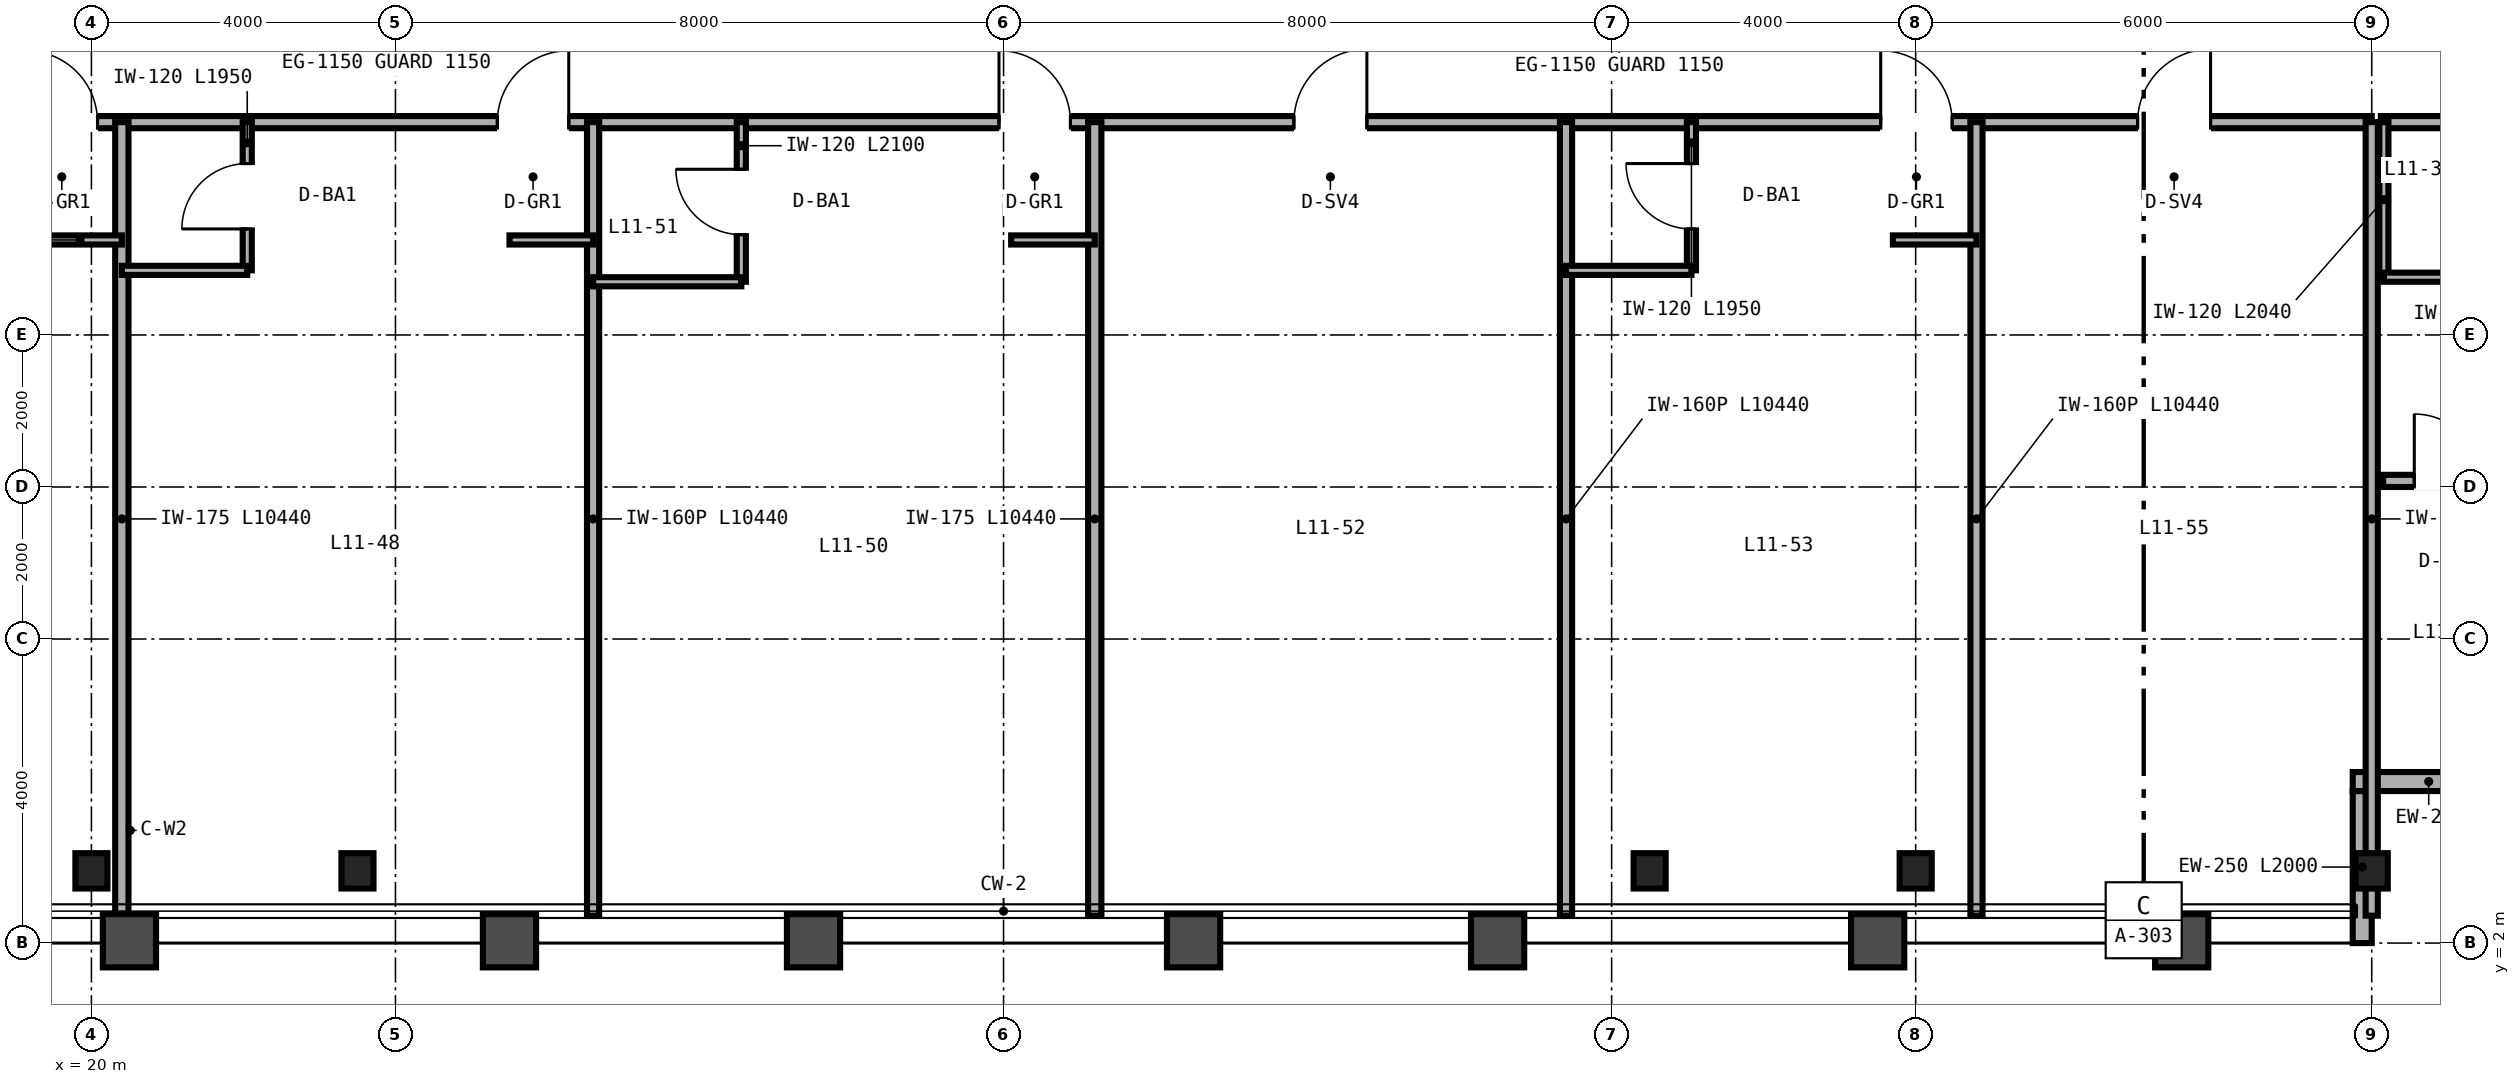
"""IFC4 building model, lengths in metres.
Left out: names, types, materials, properties, quantities, classifications, styles, units other than length and angle.
Written with IfcOpenShell. Run it as: python <this file> out.ifc"""

import sys

from ifc_helpers import new_model, si_unit, direction, frame, frame_2d, origin, origin_2d, place, context, subcontext, project, spatial, rectangle, i_section, extrude, source, transform, mapped, element, fill, save


model = new_model("IFC4")
c1 = context("Model", 3, precision=1e-05, world=origin(), true_north=direction((0.0, 1.0)))
c2 = subcontext(c1, "Body", "Model", "MODEL_VIEW")
j1 = project(units=[si_unit("LENGTHUNIT", "METRE"), si_unit("PLANEANGLEUNIT", "RADIAN")], contexts=[c1])
p1 = place(None, origin())
s1 = spatial("IfcSite", under=j1, at=p1, CompositionType="ELEMENT")
p2 = place(p1, origin())
s2 = spatial("IfcBuilding", under=s1, at=p2, CompositionType="ELEMENT")
p3 = place(p2, frame((0.0, 0.0, 49.2)))
s3 = spatial("IfcBuildingStorey", under=s2, at=p3, CompositionType="ELEMENT", Elevation=49.2)
m1 = source(origin(), c2, "Body", "SweptSolid", [
    extrude(i_section(OverallWidth=0.422, OverallDepth=0.465, WebThickness=0.045, FlangeThickness=0.073, FilletRadius=0.025, at=origin_2d()), origin(), (0.0, 0.0, 1.0), 3.35),
])
for number, where, z_axis, x_axis in (
    (1, (20.0, 2.95, 0.0), (0.0, 0.0, 1.0), (1.0, 0.0, 0.0)),
    (2, (23.5, 2.95, 0.0), (0.0, 0.0, 1.0), (1.0, 0.0, 0.0)),
    (3, (40.5, 2.95, 0.0), (0.0, 0.0, 1.0), (1.0, 0.0, 0.0)),
    (4, (44.0, 2.95, 0.0), (0.0, 0.0, 1.0), (1.0, 0.0, 0.0)),
    (5, (50.0, 2.95, 0.0), (0.0, 0.0, 1.0), (1.0, 0.0, 0.0)),
):
    element("IfcColumn", number, at=place(p3, frame(where, z_axis=z_axis, x_axis=x_axis)), inside=s3, PredefinedType="COLUMN", context=c2, shape_type="MappedRepresentation", body=[
        mapped(m1, transform((0.0, 0.0, 0.0), scale=1.0)),
    ])
p4 = place(p3, frame((49.875, 2.0, 0.0), z_axis=(0.0, 0.0, 1.0), x_axis=(0.0, 1.0, 0.0)))
e6 = element("IfcWall", 6, at=p4, inside=s3, PredefinedType="SOLIDWALL", context=c2, shape_type="SweptSolid", body=[
    extrude(rectangle(XDim=2.0, YDim=0.25, at=frame_2d((1.0, 0.0))), origin(), (0.0, 0.0, 1.0), 2.657),
])
p5 = place(p3, frame((49.75, 4.125, 0.0), z_axis=(0.0, 0.0, 1.0), x_axis=(1.0, 0.0, 0.0)))
e7 = element("IfcWall", 7, at=p5, inside=s3, PredefinedType="SOLIDWALL", context=c2, shape_type="SweptSolid", body=[
    extrude(rectangle(XDim=2.0, YDim=0.25, at=frame_2d((1.0, 0.0))), origin(), (0.0, 0.0, 1.0), 3.35),
])
p6 = place(p3, frame((50.12, 12.8, 0.0), z_axis=(0.0, 0.0, 1.0), x_axis=(1.0, 0.0, 0.0)))
e8 = element("IfcWall", 8, at=p6, inside=s3, PredefinedType="PARTITIONING", context=c2, shape_type="SweptSolid", body=[
    extrude(rectangle(XDim=5.68, YDim=0.16, at=frame_2d((2.84, 0.0))), origin(), (0.0, 0.0, 1.0), 3.35),
])
p7 = place(p6, frame((3.15, 0.0, 0.0)))
e9 = element("IfcOpeningElement", 9, at=p7, cuts=e8, PredefinedType="OPENING", context=c2, shape_type="SweptSolid", body=[
    extrude(rectangle(XDim=0.94, YDim=2.15, at=frame_2d((0.47, 1.075))), frame((0.0, 0.09, 0.0), z_axis=(0.0, -1.0, 0.0), x_axis=(1.0, 0.0, 0.0)), (0.0, 0.0, 1.0), 0.18),
])
p8 = place(p3, frame((50.16, 10.76, 0.0), z_axis=(0.0, 0.0, 1.0), x_axis=(0.0, 1.0, 0.0)))
e10 = element("IfcWall", 10, at=p8, inside=s3, PredefinedType="PARTITIONING", context=c2, shape_type="SweptSolid", body=[
    extrude(rectangle(XDim=2.04, YDim=0.12, at=frame_2d((1.02, 0.0))), origin(), (0.0, 0.0, 1.0), 3.35),
])
p9 = place(p3, frame((50.16, 10.76, 0.0), z_axis=(0.0, 0.0, 1.0), x_axis=(1.0, 0.0, 0.0)))
e11 = element("IfcWall", 11, at=p9, inside=s3, PredefinedType="PARTITIONING", context=c2, shape_type="SweptSolid", body=[
    extrude(rectangle(XDim=1.65, YDim=0.12, at=frame_2d((0.825, 0.0))), origin(), (0.0, 0.0, 1.0), 3.35),
])
p10 = place(p3, frame((50.15, 8.08, 0.0), z_axis=(0.0, 0.0, 1.0), x_axis=(1.0, 0.0, 0.0)))
e12 = element("IfcWall", 12, at=p10, inside=s3, PredefinedType="PARTITIONING", context=c2, shape_type="SweptSolid", body=[
    extrude(rectangle(XDim=1.7, YDim=0.16, at=frame_2d((0.85, 0.0))), origin(), (0.0, 0.0, 1.0), 3.35),
])
p11 = place(p10, frame((0.41, 0.0, 0.0)))
e13 = element("IfcOpeningElement", 13, at=p11, cuts=e12, PredefinedType="OPENING", context=c2, shape_type="SweptSolid", body=[
    extrude(rectangle(XDim=0.88, YDim=2.15, at=frame_2d((0.44, 1.075))), frame((0.0, 0.09, 0.0), z_axis=(0.0, -1.0, 0.0), x_axis=(1.0, 0.0, 0.0)), (0.0, 0.0, 1.0), 0.18),
])
p12 = place(p3, frame((14.0, 12.8, 0.0), z_axis=(0.0, 0.0, 1.0), x_axis=(1.0, 0.0, 0.0)))
e14 = element("IfcWall", 14, at=p12, inside=s3, PredefinedType="PARTITIONING", context=c2, shape_type="SweptSolid", body=[
    extrude(rectangle(XDim=36.0, YDim=0.16, at=frame_2d((18.0, 0.0))), origin(), (0.0, 0.0, 1.0), 2.571),
])
p13 = place(p12, frame((5.14, 0.0, 0.0)))
e15 = element("IfcOpeningElement", 15, at=p13, cuts=e14, PredefinedType="OPENING", context=c2, shape_type="SweptSolid", body=[
    extrude(rectangle(XDim=0.94, YDim=2.15, at=frame_2d((0.47, 1.075))), frame((0.0, 0.09, 0.0), z_axis=(0.0, -1.0, 0.0), x_axis=(1.0, 0.0, 0.0)), (0.0, 0.0, 1.0), 0.18),
])
p14 = place(p12, frame((11.34, 0.0, 0.0)))
e16 = element("IfcOpeningElement", 16, at=p14, cuts=e14, PredefinedType="OPENING", context=c2, shape_type="SweptSolid", body=[
    extrude(rectangle(XDim=0.94, YDim=2.15, at=frame_2d((0.47, 1.075))), frame((0.0, 0.09, 0.0), z_axis=(0.0, -1.0, 0.0), x_axis=(1.0, 0.0, 0.0)), (0.0, 0.0, 1.0), 0.18),
])
p15 = place(p12, frame((17.94, 0.0, 0.0)))
e17 = element("IfcOpeningElement", 17, at=p15, cuts=e14, PredefinedType="OPENING", context=c2, shape_type="SweptSolid", body=[
    extrude(rectangle(XDim=0.94, YDim=2.15, at=frame_2d((0.47, 1.075))), frame((0.0, 0.09, 0.0), z_axis=(0.0, -1.0, 0.0), x_axis=(1.0, 0.0, 0.0)), (0.0, 0.0, 1.0), 0.18),
])
p16 = place(p12, frame((21.82, 0.0, 0.0)))
e18 = element("IfcOpeningElement", 18, at=p16, cuts=e14, PredefinedType="OPENING", context=c2, shape_type="SweptSolid", body=[
    extrude(rectangle(XDim=0.96, YDim=2.15, at=frame_2d((0.48, 1.075))), frame((0.0, 0.09, 0.0), z_axis=(0.0, -1.0, 0.0), x_axis=(1.0, 0.0, 0.0)), (0.0, 0.0, 1.0), 0.18),
])
p17 = place(p12, frame((29.54, 0.0, 0.0)))
e19 = element("IfcOpeningElement", 19, at=p17, cuts=e14, PredefinedType="OPENING", context=c2, shape_type="SweptSolid", body=[
    extrude(rectangle(XDim=0.94, YDim=2.15, at=frame_2d((0.47, 1.075))), frame((0.0, 0.09, 0.0), z_axis=(0.0, -1.0, 0.0), x_axis=(1.0, 0.0, 0.0)), (0.0, 0.0, 1.0), 0.18),
])
p18 = place(p12, frame((32.92, 0.0, 0.0)))
e20 = element("IfcOpeningElement", 20, at=p18, cuts=e14, PredefinedType="OPENING", context=c2, shape_type="SweptSolid", body=[
    extrude(rectangle(XDim=0.96, YDim=2.15, at=frame_2d((0.48, 1.075))), frame((0.0, 0.09, 0.0), z_axis=(0.0, -1.0, 0.0), x_axis=(1.0, 0.0, 0.0)), (0.0, 0.0, 1.0), 0.18),
])
p19 = place(p3, frame((50.0, 2.36, 0.0), z_axis=(0.0, 0.0, 1.0), x_axis=(0.0, 1.0, 0.0)))
e21 = element("IfcWall", 21, at=p19, inside=s3, PredefinedType="PARTITIONING", context=c2, shape_type="SweptSolid", body=[
    extrude(rectangle(XDim=10.44, YDim=0.16, at=frame_2d((5.22, 0.0))), origin(), (0.0, 0.0, 1.0), 2.657),
])
p20 = place(p3, frame((20.4, 2.36, 0.0), z_axis=(0.0, 0.0, 1.0), x_axis=(0.0, 1.0, 0.0)))
e22 = element("IfcWall", 22, at=p20, inside=s3, PredefinedType="PARTITIONING", context=c2, shape_type="SweptSolid", body=[
    extrude(rectangle(XDim=10.44, YDim=0.175, at=frame_2d((5.22, 0.0))), origin(), (0.0, 0.0, 1.0), 2.813),
])
p21 = place(p3, frame((19.3, 11.25, 0.0), z_axis=(0.0, 0.0, 1.0), x_axis=(1.0, 0.0, 0.0)))
e23 = element("IfcWall", 23, at=p21, inside=s3, PredefinedType="PARTITIONING", context=c2, shape_type="SweptSolid", body=[
    extrude(rectangle(XDim=1.1, YDim=0.12, at=frame_2d((0.55, 0.0))), origin(), (0.0, 0.0, 1.0), 3.35),
])
p22 = place(p3, frame((26.6, 2.36, 0.0), z_axis=(0.0, 0.0, 1.0), x_axis=(0.0, 1.0, 0.0)))
e24 = element("IfcWall", 24, at=p22, inside=s3, PredefinedType="PARTITIONING", context=c2, shape_type="SweptSolid", body=[
    extrude(rectangle(XDim=10.44, YDim=0.16, at=frame_2d((5.22, 0.0))), origin(), (0.0, 0.0, 1.0), 2.423),
])
p23 = place(p3, frame((22.05, 10.85, 0.0), z_axis=(0.0, 0.0, 1.0), x_axis=(0.0, 1.0, 0.0)))
e25 = element("IfcWall", 25, at=p23, inside=s3, PredefinedType="PARTITIONING", context=c2, shape_type="SweptSolid", body=[
    extrude(rectangle(XDim=1.95, YDim=0.12, at=frame_2d((0.975, 0.0))), origin(), (0.0, 0.0, 1.0), 3.35),
])
p24 = place(p23, frame((0.545, 0.0, 0.0)))
e26 = element("IfcOpeningElement", 26, at=p24, cuts=e25, PredefinedType="OPENING", context=c2, shape_type="SweptSolid", body=[
    extrude(rectangle(XDim=0.86, YDim=2.1, at=frame_2d((0.43, 1.05))), frame((0.0, 0.07, 0.0), z_axis=(0.0, -1.0, 0.0), x_axis=(1.0, 0.0, 0.0)), (0.0, 0.0, 1.0), 0.14),
])
p25 = place(p3, frame((20.4, 10.85, 0.0), z_axis=(0.0, 0.0, 1.0), x_axis=(1.0, 0.0, 0.0)))
e27 = element("IfcWall", 27, at=p25, inside=s3, PredefinedType="PARTITIONING", context=c2, shape_type="SweptSolid", body=[
    extrude(rectangle(XDim=1.65, YDim=0.12, at=frame_2d((0.825, 0.0))), origin(), (0.0, 0.0, 1.0), 3.35),
])
p26 = place(p3, frame((25.5, 11.25, 0.0), z_axis=(0.0, 0.0, 1.0), x_axis=(1.0, 0.0, 0.0)))
e28 = element("IfcWall", 28, at=p26, inside=s3, PredefinedType="PARTITIONING", context=c2, shape_type="SweptSolid", body=[
    extrude(rectangle(XDim=1.1, YDim=0.12, at=frame_2d((0.55, 0.0))), origin(), (0.0, 0.0, 1.0), 3.35),
])
p27 = place(p3, frame((33.2, 2.36, 0.0), z_axis=(0.0, 0.0, 1.0), x_axis=(0.0, 1.0, 0.0)))
e29 = element("IfcWall", 29, at=p27, inside=s3, PredefinedType="PARTITIONING", context=c2, shape_type="SweptSolid", body=[
    extrude(rectangle(XDim=10.44, YDim=0.175, at=frame_2d((5.22, 0.0))), origin(), (0.0, 0.0, 1.0), 2.423),
])
p28 = place(p3, frame((28.55, 10.7, 0.0), z_axis=(0.0, 0.0, 1.0), x_axis=(0.0, 1.0, 0.0)))
e30 = element("IfcWall", 30, at=p28, inside=s3, PredefinedType="PARTITIONING", context=c2, shape_type="SweptSolid", body=[
    extrude(rectangle(XDim=2.1, YDim=0.12, at=frame_2d((1.05, 0.0))), origin(), (0.0, 0.0, 1.0), 3.35),
])
p29 = place(p28, frame((0.62, 0.0, 0.0)))
e31 = element("IfcOpeningElement", 31, at=p29, cuts=e30, PredefinedType="OPENING", context=c2, shape_type="SweptSolid", body=[
    extrude(rectangle(XDim=0.86, YDim=2.1, at=frame_2d((0.43, 1.05))), frame((0.0, 0.07, 0.0), z_axis=(0.0, -1.0, 0.0), x_axis=(1.0, 0.0, 0.0)), (0.0, 0.0, 1.0), 0.14),
])
p30 = place(p3, frame((26.6, 10.7, 0.0), z_axis=(0.0, 0.0, 1.0), x_axis=(1.0, 0.0, 0.0)))
e32 = element("IfcWall", 32, at=p30, inside=s3, PredefinedType="PARTITIONING", context=c2, shape_type="SweptSolid", body=[
    extrude(rectangle(XDim=1.95, YDim=0.12, at=frame_2d((0.975, 0.0))), origin(), (0.0, 0.0, 1.0), 3.35),
])
p31 = place(p3, frame((32.1, 11.25, 0.0), z_axis=(0.0, 0.0, 1.0), x_axis=(1.0, 0.0, 0.0)))
e33 = element("IfcWall", 33, at=p31, inside=s3, PredefinedType="PARTITIONING", context=c2, shape_type="SweptSolid", body=[
    extrude(rectangle(XDim=1.1, YDim=0.12, at=frame_2d((0.55, 0.0))), origin(), (0.0, 0.0, 1.0), 3.35),
])
p32 = place(p3, frame((39.4, 2.36, 0.0), z_axis=(0.0, 0.0, 1.0), x_axis=(0.0, 1.0, 0.0)))
e34 = element("IfcWall", 34, at=p32, inside=s3, PredefinedType="PARTITIONING", context=c2, shape_type="SweptSolid", body=[
    extrude(rectangle(XDim=10.44, YDim=0.16, at=frame_2d((5.22, 0.0))), origin(), (0.0, 0.0, 1.0), 2.423),
])
p33 = place(p3, frame((44.8, 2.36, 0.0), z_axis=(0.0, 0.0, 1.0), x_axis=(0.0, 1.0, 0.0)))
e35 = element("IfcWall", 35, at=p33, inside=s3, PredefinedType="PARTITIONING", context=c2, shape_type="SweptSolid", body=[
    extrude(rectangle(XDim=10.44, YDim=0.16, at=frame_2d((5.22, 0.0))), origin(), (0.0, 0.0, 1.0), 2.657),
])
p34 = place(p3, frame((41.05, 10.85, 0.0), z_axis=(0.0, 0.0, 1.0), x_axis=(0.0, 1.0, 0.0)))
e36 = element("IfcWall", 36, at=p34, inside=s3, PredefinedType="PARTITIONING", context=c2, shape_type="SweptSolid", body=[
    extrude(rectangle(XDim=1.95, YDim=0.12, at=frame_2d((0.975, 0.0))), origin(), (0.0, 0.0, 1.0), 3.35),
])
p35 = place(p34, frame((0.545, 0.0, 0.0)))
e37 = element("IfcOpeningElement", 37, at=p35, cuts=e36, PredefinedType="OPENING", context=c2, shape_type="SweptSolid", body=[
    extrude(rectangle(XDim=0.86, YDim=2.1, at=frame_2d((0.43, 1.05))), frame((0.0, 0.07, 0.0), z_axis=(0.0, -1.0, 0.0), x_axis=(1.0, 0.0, 0.0)), (0.0, 0.0, 1.0), 0.14),
])
p36 = place(p3, frame((39.4, 10.85, 0.0), z_axis=(0.0, 0.0, 1.0), x_axis=(1.0, 0.0, 0.0)))
e38 = element("IfcWall", 38, at=p36, inside=s3, PredefinedType="PARTITIONING", context=c2, shape_type="SweptSolid", body=[
    extrude(rectangle(XDim=1.65, YDim=0.12, at=frame_2d((0.825, 0.0))), origin(), (0.0, 0.0, 1.0), 2.571),
])
p37 = place(p3, frame((43.7, 11.25, 0.0), z_axis=(0.0, 0.0, 1.0), x_axis=(1.0, 0.0, 0.0)))
e39 = element("IfcWall", 39, at=p37, inside=s3, PredefinedType="PARTITIONING", context=c2, shape_type="SweptSolid", body=[
    extrude(rectangle(XDim=1.1, YDim=0.12, at=frame_2d((0.55, 0.0))), origin(), (0.0, 0.0, 1.0), 3.35),
])
m2 = source(origin(), c2, "Body", "SweptSolid", [
    extrude(rectangle(XDim=0.88, YDim=2.15, at=frame_2d((0.44, 1.075))), frame((0.0, 0.025, 0.0), z_axis=(0.0, -1.0, 0.0), x_axis=(1.0, 0.0, 0.0)), (0.0, 0.0, 1.0), 0.05),
])
p38 = place(p11, origin())
e40 = element("IfcDoor", 40, at=p38, inside=s3, OperationType="SINGLE_SWING_LEFT", PredefinedType="DOOR", context=c2, shape_type="MappedRepresentation", body=[
    mapped(m2, transform((0.0, 0.0, 0.0), scale=1.0)),
])
fill(e13, e40)
m3 = source(origin(), c2, "Body", "SweptSolid", [
    extrude(rectangle(XDim=0.86, YDim=2.1, at=frame_2d((0.43, 1.05))), frame((0.0, 0.025, 0.0), z_axis=(0.0, -1.0, 0.0), x_axis=(1.0, 0.0, 0.0)), (0.0, 0.0, 1.0), 0.05),
])
p39 = place(p24, origin())
e41 = element("IfcDoor", 41, at=p39, inside=s3, OperationType="SINGLE_SWING_LEFT", PredefinedType="DOOR", context=c2, shape_type="MappedRepresentation", body=[
    mapped(m3, transform((0.0, 0.0, 0.0), scale=1.0)),
])
fill(e26, e41)
p40 = place(p29, origin())
e42 = element("IfcDoor", 42, at=p40, inside=s3, OperationType="SINGLE_SWING_RIGHT", PredefinedType="DOOR", context=c2, shape_type="MappedRepresentation", body=[
    mapped(m3, transform((0.0, 0.0, 0.0), scale=1.0)),
])
fill(e31, e42)
p41 = place(p35, origin())
e43 = element("IfcDoor", 43, at=p41, inside=s3, OperationType="SINGLE_SWING_RIGHT", PredefinedType="DOOR", context=c2, shape_type="MappedRepresentation", body=[
    mapped(m3, transform((0.0, 0.0, 0.0), scale=1.0)),
])
fill(e37, e43)
m4 = source(origin(), c2, "Body", "SweptSolid", [
    extrude(rectangle(XDim=0.94, YDim=2.15, at=frame_2d((0.47, 1.075))), frame((0.0, 0.025, 0.0), z_axis=(0.0, -1.0, 0.0), x_axis=(1.0, 0.0, 0.0)), (0.0, 0.0, 1.0), 0.05),
])
p42 = place(p13, origin())
e44 = element("IfcDoor", 44, at=p42, inside=s3, OperationType="SINGLE_SWING_LEFT", PredefinedType="DOOR", context=c2, shape_type="MappedRepresentation", body=[
    mapped(m4, transform((0.0, 0.0, 0.0), scale=1.0)),
])
fill(e15, e44)
p43 = place(p14, origin())
e45 = element("IfcDoor", 45, at=p43, inside=s3, OperationType="SINGLE_SWING_RIGHT", PredefinedType="DOOR", context=c2, shape_type="MappedRepresentation", body=[
    mapped(m4, transform((0.0, 0.0, 0.0), scale=1.0)),
])
fill(e16, e45)
p44 = place(p15, origin())
e46 = element("IfcDoor", 46, at=p44, inside=s3, OperationType="SINGLE_SWING_LEFT", PredefinedType="DOOR", context=c2, shape_type="MappedRepresentation", body=[
    mapped(m4, transform((0.0, 0.0, 0.0), scale=1.0)),
])
fill(e17, e46)
m5 = source(origin(), c2, "Body", "SweptSolid", [
    extrude(rectangle(XDim=0.96, YDim=2.15, at=frame_2d((0.48, 1.075))), frame((0.0, 0.025, 0.0), z_axis=(0.0, -1.0, 0.0), x_axis=(1.0, 0.0, 0.0)), (0.0, 0.0, 1.0), 0.05),
])
p45 = place(p16, origin())
e47 = element("IfcDoor", 47, at=p45, inside=s3, OperationType="SINGLE_SWING_RIGHT", PredefinedType="DOOR", context=c2, shape_type="MappedRepresentation", body=[
    mapped(m5, transform((0.0, 0.0, 0.0), scale=1.0)),
])
fill(e18, e47)
p46 = place(p17, origin())
e48 = element("IfcDoor", 48, at=p46, inside=s3, OperationType="SINGLE_SWING_LEFT", PredefinedType="DOOR", context=c2, shape_type="MappedRepresentation", body=[
    mapped(m4, transform((0.0, 0.0, 0.0), scale=1.0)),
])
fill(e19, e48)
p47 = place(p18, origin())
e49 = element("IfcDoor", 49, at=p47, inside=s3, OperationType="SINGLE_SWING_RIGHT", PredefinedType="DOOR", context=c2, shape_type="MappedRepresentation", body=[
    mapped(m5, transform((0.0, 0.0, 0.0), scale=1.0)),
])
fill(e20, e49)
save(model, sys.argv[1])
